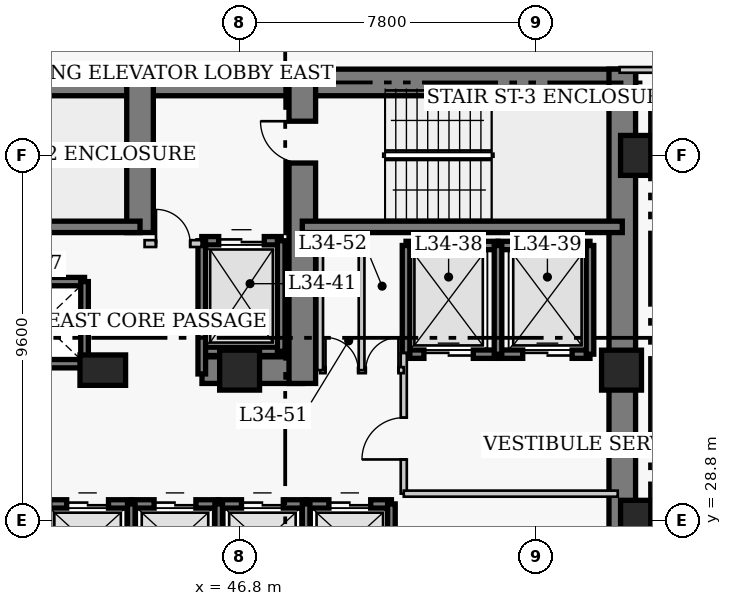
"""IFC4 building model, lengths in metres.
Left out: names, types, materials, properties, quantities, classifications, styles, units other than length and angle.
Written with IfcOpenShell. Run it as: python <this file> out.ifc"""

import sys

from ifc_helpers import new_model, si_unit, direction, frame, frame_2d, origin, origin_2d, place, context, subcontext, project, spatial, rectangle, extrude, element, fill, save


model = new_model("IFC4")
c1 = context("Model", 3, precision=1e-05, world=origin(), true_north=direction((0.0, 1.0)))
c2 = subcontext(c1, "Body", "Model", "MODEL_VIEW")
j1 = project(units=[si_unit("LENGTHUNIT", "METRE"), si_unit("PLANEANGLEUNIT", "RADIAN")], contexts=[c1])
p1 = place(None, origin())
s1 = spatial("IfcSite", under=j1, at=p1, CompositionType="ELEMENT")
p2 = place(p1, origin())
s2 = spatial("IfcBuilding", under=s1, at=p2, CompositionType="ELEMENT")
p3 = place(p2, frame((0.0, 0.0, 138.4)))
s3 = spatial("IfcBuildingStorey", under=s2, at=p3, CompositionType="ELEMENT", Elevation=138.4)
p4 = place(p3, frame((35.85, 40.32, 0.0), z_axis=(0.0, 0.0, 1.0), x_axis=(1.0, 0.0, 0.0)))
e1 = element("IfcWall", 1, at=p4, inside=s3, PredefinedType="SHEAR", context=c2, shape_type="SweptSolid", body=[
    extrude(rectangle(XDim=12.6, YDim=0.7, at=frame_2d((6.3, 0.0))), origin(), (0.0, 0.0, 1.0), 3.8),
])
p5 = place(p3, frame((48.45, 40.32, 0.0), z_axis=(0.0, 0.0, 1.0), x_axis=(1.0, 0.0, 0.0)))
e2 = element("IfcWall", 2, at=p5, inside=s3, PredefinedType="SHEAR", context=c2, shape_type="SweptSolid", body=[
    extrude(rectangle(XDim=8.77, YDim=0.7, at=frame_2d((4.385, 0.0))), origin(), (0.0, 0.0, 1.0), 3.8),
])
p6 = place(p3, frame((56.87, 27.05, 0.0), z_axis=(0.0, 0.0, 1.0), x_axis=(0.0, 1.0, 0.0)))
e3 = element("IfcWall", 3, at=p6, inside=s3, PredefinedType="SHEAR", context=c2, shape_type="SweptSolid", body=[
    extrude(rectangle(XDim=13.62, YDim=0.7, at=frame_2d((6.81, 0.0))), origin(), (0.0, 0.0, 1.0), 3.8),
])
p7 = place(p3, frame((45.81, 32.75, 0.0), z_axis=(0.0, 0.0, 1.0), x_axis=(1.0, 0.0, 0.0)))
e4 = element("IfcWall", 4, at=p7, inside=s3, PredefinedType="SHEAR", context=c2, shape_type="SweptSolid", body=[
    extrude(rectangle(XDim=2.64, YDim=0.7, at=frame_2d((1.32, 0.0))), origin(), (0.0, 0.0, 1.0), 3.8),
])
p8 = place(p3, frame((44.18, 36.37, 0.0), z_axis=(0.0, 0.0, 1.0), x_axis=(0.0, 1.0, 0.0)))
e5 = element("IfcWall", 5, at=p8, inside=s3, PredefinedType="SHEAR", context=c2, shape_type="SweptSolid", body=[
    extrude(rectangle(XDim=3.95, YDim=0.7, at=frame_2d((1.975, 0.0))), origin(), (0.0, 0.0, 1.0), 3.8),
])
p9 = place(p3, frame((48.45, 32.4, 0.0), z_axis=(0.0, 0.0, 1.0), x_axis=(0.0, 1.0, 0.0)))
e6 = element("IfcWall", 6, at=p9, inside=s3, PredefinedType="SHEAR", context=c2, shape_type="SweptSolid", body=[
    extrude(rectangle(XDim=7.92, YDim=0.7, at=frame_2d((3.96, 0.0))), origin(), (0.0, 0.0, 1.0), 3.8),
])
p10 = place(p9, frame((5.8, 0.0, 0.0)))
e7 = element("IfcOpeningElement", 7, at=p10, cuts=e6, PredefinedType="OPENING", context=c2, shape_type="SweptSolid", body=[
    extrude(rectangle(XDim=1.1, YDim=2.15, at=frame_2d((0.55, 1.075))), frame((0.0, 0.36, 0.0), z_axis=(0.0, -1.0, 0.0), x_axis=(1.0, 0.0, 0.0)), (0.0, 0.0, 1.0), 0.72),
])
p11 = place(p3, frame((35.85, 36.52, 0.0), z_axis=(0.0, 0.0, 1.0), x_axis=(1.0, 0.0, 0.0)))
e8 = element("IfcWall", 8, at=p11, inside=s3, PredefinedType="SHEAR", context=c2, shape_type="SweptSolid", body=[
    extrude(rectangle(XDim=8.33, YDim=0.3, at=frame_2d((4.165, 0.0))), origin(), (0.0, 0.0, 1.0), 3.8),
])
p12 = place(p3, frame((48.45, 36.52, 0.0), z_axis=(0.0, 0.0, 1.0), x_axis=(1.0, 0.0, 0.0)))
e9 = element("IfcWall", 9, at=p12, inside=s3, PredefinedType="SHEAR", context=c2, shape_type="SweptSolid", body=[
    extrude(rectangle(XDim=8.42, YDim=0.3, at=frame_2d((4.21, 0.0))), origin(), (0.0, 0.0, 1.0), 3.8),
])
for number, where, z_axis, x_axis in (
    (10, (57.35, 28.8, 0.0), (0.0, 0.0, 1.0), (1.0, 0.0, 0.0)),
    (11, (57.35, 38.4, 0.0), (0.0, 0.0, 1.0), (1.0, 0.0, 0.0)),
):
    element("IfcColumn", number, at=place(p3, frame(where, z_axis=z_axis, x_axis=x_axis)), inside=s3, PredefinedType="COLUMN", context=c2, shape_type="SweptSolid", body=[
        extrude(rectangle(XDim=1.05, YDim=1.05, at=origin_2d()), origin(), (0.0, 0.0, 1.0), 3.8),
    ])
p13 = place(p3, frame((43.2, 32.75, 0.0), z_axis=(0.0, 0.0, 1.0), x_axis=(1.0, 0.0, 0.0)))
e12 = element("IfcColumn", 12, at=p13, inside=s3, PredefinedType="COLUMN", context=c2, shape_type="SweptSolid", body=[
    extrude(rectangle(XDim=1.2, YDim=0.8, at=origin_2d()), origin(), (0.0, 0.0, 1.0), 3.8),
])
for number, where, z_axis, x_axis in (
    (13, (46.8, 32.75, 0.0), (0.0, 0.0, 1.0), (1.0, 0.0, 0.0)),
    (14, (56.85, 32.75, 0.0), (0.0, 0.0, 1.0), (1.0, 0.0, 0.0)),
):
    element("IfcColumn", number, at=place(p3, frame(where, z_axis=z_axis, x_axis=x_axis)), inside=s3, PredefinedType="COLUMN", context=c2, shape_type="SweptSolid", body=[
        extrude(rectangle(XDim=1.05, YDim=1.05, at=origin_2d()), origin(), (0.0, 0.0, 1.0), 3.8),
    ])
p14 = place(p3, frame((41.705, 29.23, 0.0), z_axis=(0.0, 0.0, 1.0), x_axis=(1.0, 0.0, 0.0)))
e15 = element("IfcWall", 15, at=p14, inside=s3, PredefinedType="SHEAR", context=c2, shape_type="SweptSolid", body=[
    extrude(rectangle(XDim=2.245, YDim=0.22, at=frame_2d((1.123, 0.0))), origin(), (0.0, 0.0, 1.0), 3.8),
])
p15 = place(p14, frame((0.545, 0.0, 0.0)))
e16 = element("IfcOpeningElement", 16, at=p15, cuts=e15, PredefinedType="OPENING", context=c2, shape_type="SweptSolid", body=[
    extrude(rectangle(XDim=1.1, YDim=2.15, at=frame_2d((0.55, 1.075))), frame((0.0, 0.12, 0.0), z_axis=(0.0, -1.0, 0.0), x_axis=(1.0, 0.0, 0.0)), (0.0, 0.0, 1.0), 0.24),
])
p16 = place(p3, frame((43.95, 29.23, 0.0), z_axis=(0.0, 0.0, 1.0), x_axis=(1.0, 0.0, 0.0)))
e17 = element("IfcWall", 17, at=p16, inside=s3, PredefinedType="SHEAR", context=c2, shape_type="SweptSolid", body=[
    extrude(rectangle(XDim=2.3, YDim=0.22, at=frame_2d((1.15, 0.0))), origin(), (0.0, 0.0, 1.0), 3.8),
])
p17 = place(p16, frame((0.6, 0.0, 0.0)))
e18 = element("IfcOpeningElement", 18, at=p17, cuts=e17, PredefinedType="OPENING", context=c2, shape_type="SweptSolid", body=[
    extrude(rectangle(XDim=1.1, YDim=2.15, at=frame_2d((0.55, 1.075))), frame((0.0, 0.12, 0.0), z_axis=(0.0, -1.0, 0.0), x_axis=(1.0, 0.0, 0.0)), (0.0, 0.0, 1.0), 0.24),
])
p18 = place(p3, frame((43.95, 27.17, 0.0), z_axis=(0.0, 0.0, 1.0), x_axis=(0.0, 1.0, 0.0)))
e19 = element("IfcWall", 19, at=p18, inside=s3, PredefinedType="SHEAR", context=c2, shape_type="SweptSolid", body=[
    extrude(rectangle(XDim=2.06, YDim=0.2, at=frame_2d((1.03, 0.0))), origin(), (0.0, 0.0, 1.0), 3.8),
])
p19 = place(p3, frame((46.25, 29.23, 0.0), z_axis=(0.0, 0.0, 1.0), x_axis=(1.0, 0.0, 0.0)))
e20 = element("IfcWall", 20, at=p19, inside=s3, PredefinedType="SHEAR", context=c2, shape_type="SweptSolid", body=[
    extrude(rectangle(XDim=2.3, YDim=0.22, at=frame_2d((1.15, 0.0))), origin(), (0.0, 0.0, 1.0), 3.8),
])
p20 = place(p19, frame((0.6, 0.0, 0.0)))
e21 = element("IfcOpeningElement", 21, at=p20, cuts=e20, PredefinedType="OPENING", context=c2, shape_type="SweptSolid", body=[
    extrude(rectangle(XDim=1.1, YDim=2.15, at=frame_2d((0.55, 1.075))), frame((0.0, 0.12, 0.0), z_axis=(0.0, -1.0, 0.0), x_axis=(1.0, 0.0, 0.0)), (0.0, 0.0, 1.0), 0.24),
])
p21 = place(p3, frame((46.25, 27.17, 0.0), z_axis=(0.0, 0.0, 1.0), x_axis=(0.0, 1.0, 0.0)))
e22 = element("IfcWall", 22, at=p21, inside=s3, PredefinedType="SHEAR", context=c2, shape_type="SweptSolid", body=[
    extrude(rectangle(XDim=2.06, YDim=0.2, at=frame_2d((1.03, 0.0))), origin(), (0.0, 0.0, 1.0), 3.8),
])
p22 = place(p3, frame((48.55, 29.23, 0.0), z_axis=(0.0, 0.0, 1.0), x_axis=(1.0, 0.0, 0.0)))
e23 = element("IfcWall", 23, at=p22, inside=s3, PredefinedType="SHEAR", context=c2, shape_type="SweptSolid", body=[
    extrude(rectangle(XDim=2.245, YDim=0.22, at=frame_2d((1.123, 0.0))), origin(), (0.0, 0.0, 1.0), 3.8),
])
p23 = place(p22, frame((0.6, 0.0, 0.0)))
e24 = element("IfcOpeningElement", 24, at=p23, cuts=e23, PredefinedType="OPENING", context=c2, shape_type="SweptSolid", body=[
    extrude(rectangle(XDim=1.1, YDim=2.15, at=frame_2d((0.55, 1.075))), frame((0.0, 0.12, 0.0), z_axis=(0.0, -1.0, 0.0), x_axis=(1.0, 0.0, 0.0)), (0.0, 0.0, 1.0), 0.24),
])
for number, where, z_axis, x_axis in (
    (25, (48.55, 27.17, 0.0), (0.0, 0.0, 1.0), (0.0, 1.0, 0.0)),
    (26, (50.795, 27.17, 0.0), (0.0, 0.0, 1.0), (0.0, 1.0, 0.0)),
):
    element("IfcWall", number, at=place(p3, frame(where, z_axis=z_axis, x_axis=x_axis)), inside=s3, PredefinedType="SHEAR", context=c2, shape_type="SweptSolid", body=[
        extrude(rectangle(XDim=2.06, YDim=0.2, at=frame_2d((1.03, 0.0))), origin(), (0.0, 0.0, 1.0), 3.8),
    ])
for number, where, z_axis, x_axis in (
    (27, (40.4, 35.08, 0.0), (0.0, 0.0, 1.0), (1.0, 0.0, 0.0)),
    (28, (40.4, 32.92, 0.0), (0.0, 0.0, 1.0), (1.0, 0.0, 0.0)),
):
    element("IfcWall", number, at=place(p3, frame(where, z_axis=z_axis, x_axis=x_axis)), inside=s3, PredefinedType="SHEAR", context=c2, shape_type="SweptSolid", body=[
        extrude(rectangle(XDim=2.32, YDim=0.22, at=frame_2d((1.16, 0.0))), origin(), (0.0, 0.0, 1.0), 3.8),
    ])
p24 = place(p3, frame((42.72, 32.92, 0.0), z_axis=(0.0, 0.0, 1.0), x_axis=(0.0, 1.0, 0.0)))
e29 = element("IfcWall", 29, at=p24, inside=s3, PredefinedType="SHEAR", context=c2, shape_type="SweptSolid", body=[
    extrude(rectangle(XDim=2.16, YDim=0.2, at=frame_2d((1.08, 0.0))), origin(), (0.0, 0.0, 1.0), 3.8),
])
p25 = place(p3, frame((51.18, 36.03, 0.0), z_axis=(0.0, 0.0, 1.0), x_axis=(1.0, 0.0, 0.0)))
e30 = element("IfcWall", 30, at=p25, inside=s3, PredefinedType="SHEAR", context=c2, shape_type="SweptSolid", body=[
    extrude(rectangle(XDim=2.42, YDim=0.22, at=frame_2d((1.21, 0.0))), origin(), (0.0, 0.0, 1.0), 3.8),
])
p26 = place(p3, frame((51.18, 33.17, 0.0), z_axis=(0.0, 0.0, 1.0), x_axis=(1.0, 0.0, 0.0)))
e31 = element("IfcWall", 31, at=p26, inside=s3, PredefinedType="SHEAR", context=c2, shape_type="SweptSolid", body=[
    extrude(rectangle(XDim=2.42, YDim=0.22, at=frame_2d((1.21, 0.0))), origin(), (0.0, 0.0, 1.0), 3.8),
])
p27 = place(p26, frame((0.47, 0.0, 0.0)))
e32 = element("IfcOpeningElement", 32, at=p27, cuts=e31, PredefinedType="OPENING", context=c2, shape_type="SweptSolid", body=[
    extrude(rectangle(XDim=1.3, YDim=2.15, at=frame_2d((0.65, 1.075))), frame((0.0, 0.12, 0.0), z_axis=(0.0, -1.0, 0.0), x_axis=(1.0, 0.0, 0.0)), (0.0, 0.0, 1.0), 0.24),
])
p28 = place(p3, frame((51.18, 33.17, 0.0), z_axis=(0.0, 0.0, 1.0), x_axis=(0.0, 1.0, 0.0)))
e33 = element("IfcWall", 33, at=p28, inside=s3, PredefinedType="SHEAR", context=c2, shape_type="SweptSolid", body=[
    extrude(rectangle(XDim=2.86, YDim=0.2, at=frame_2d((1.43, 0.0))), origin(), (0.0, 0.0, 1.0), 3.8),
])
p29 = place(p3, frame((53.6, 36.03, 0.0), z_axis=(0.0, 0.0, 1.0), x_axis=(1.0, 0.0, 0.0)))
e34 = element("IfcWall", 34, at=p29, inside=s3, PredefinedType="SHEAR", context=c2, shape_type="SweptSolid", body=[
    extrude(rectangle(XDim=2.42, YDim=0.22, at=frame_2d((1.21, 0.0))), origin(), (0.0, 0.0, 1.0), 3.8),
])
p30 = place(p3, frame((53.6, 33.17, 0.0), z_axis=(0.0, 0.0, 1.0), x_axis=(1.0, 0.0, 0.0)))
e35 = element("IfcWall", 35, at=p30, inside=s3, PredefinedType="SHEAR", context=c2, shape_type="SweptSolid", body=[
    extrude(rectangle(XDim=2.42, YDim=0.22, at=frame_2d((1.21, 0.0))), origin(), (0.0, 0.0, 1.0), 3.8),
])
p31 = place(p30, frame((0.65, 0.0, 0.0)))
e36 = element("IfcOpeningElement", 36, at=p31, cuts=e35, PredefinedType="OPENING", context=c2, shape_type="SweptSolid", body=[
    extrude(rectangle(XDim=1.3, YDim=2.15, at=frame_2d((0.65, 1.075))), frame((0.0, 0.12, 0.0), z_axis=(0.0, -1.0, 0.0), x_axis=(1.0, 0.0, 0.0)), (0.0, 0.0, 1.0), 0.24),
])
for number, where, z_axis, x_axis in (
    (37, (53.6, 33.17, 0.0), (0.0, 0.0, 1.0), (0.0, 1.0, 0.0)),
    (38, (56.02, 33.17, 0.0), (0.0, 0.0, 1.0), (0.0, 1.0, 0.0)),
):
    element("IfcWall", number, at=place(p3, frame(where, z_axis=z_axis, x_axis=x_axis)), inside=s3, PredefinedType="SHEAR", context=c2, shape_type="SweptSolid", body=[
        extrude(rectangle(XDim=2.86, YDim=0.2, at=frame_2d((1.43, 0.0))), origin(), (0.0, 0.0, 1.0), 3.8),
    ])
p32 = place(p3, frame((45.805, 36.155, 0.0), z_axis=(0.0, 0.0, 1.0), x_axis=(1.0, 0.0, 0.0)))
e39 = element("IfcWall", 39, at=p32, inside=s3, PredefinedType="SHEAR", context=c2, shape_type="SweptSolid", body=[
    extrude(rectangle(XDim=2.09, YDim=0.22, at=frame_2d((1.045, 0.0))), origin(), (0.0, 0.0, 1.0), 3.8),
])
p33 = place(p32, frame((0.445, 0.0, 0.0)))
e40 = element("IfcOpeningElement", 40, at=p33, cuts=e39, PredefinedType="OPENING", context=c2, shape_type="SweptSolid", body=[
    extrude(rectangle(XDim=1.2, YDim=2.15, at=frame_2d((0.6, 1.075))), frame((0.0, 0.12, 0.0), z_axis=(0.0, -1.0, 0.0), x_axis=(1.0, 0.0, 0.0)), (0.0, 0.0, 1.0), 0.24),
])
p34 = place(p3, frame((45.805, 33.245, 0.0), z_axis=(0.0, 0.0, 1.0), x_axis=(1.0, 0.0, 0.0)))
e41 = element("IfcWall", 41, at=p34, inside=s3, PredefinedType="SHEAR", context=c2, shape_type="SweptSolid", body=[
    extrude(rectangle(XDim=2.09, YDim=0.22, at=frame_2d((1.045, 0.0))), origin(), (0.0, 0.0, 1.0), 3.8),
])
p35 = place(p3, frame((45.805, 32.65, 0.0), z_axis=(0.0, 0.0, 1.0), x_axis=(0.0, 1.0, 0.0)))
e42 = element("IfcWall", 42, at=p35, inside=s3, PredefinedType="SHEAR", context=c2, shape_type="SweptSolid", body=[
    extrude(rectangle(XDim=3.505, YDim=0.2, at=frame_2d((1.752, 0.0))), origin(), (0.0, 0.0, 1.0), 3.8),
])
p36 = place(p3, frame((47.895, 33.245, 0.0), z_axis=(0.0, 0.0, 1.0), x_axis=(0.0, 1.0, 0.0)))
e43 = element("IfcWall", 43, at=p36, inside=s3, PredefinedType="SHEAR", context=c2, shape_type="SweptSolid", body=[
    extrude(rectangle(XDim=2.91, YDim=0.2, at=frame_2d((1.455, 0.0))), origin(), (0.0, 0.0, 1.0), 3.8),
])
p37 = place(p3, frame((44.3, 36.08, 0.0), z_axis=(0.0, 0.0, 1.0), x_axis=(1.0, 0.0, 0.0)))
e44 = element("IfcWall", 44, at=p37, inside=s3, PredefinedType="PARTITIONING", context=c2, shape_type="SweptSolid", body=[
    extrude(rectangle(XDim=1.5, YDim=0.18, at=frame_2d((0.75, 0.0))), origin(), (0.0, 0.0, 1.0), 3.55),
])
p38 = place(p37, frame((0.3, 0.0, 0.0)))
e45 = element("IfcOpeningElement", 45, at=p38, cuts=e44, PredefinedType="OPENING", context=c2, shape_type="SweptSolid", body=[
    extrude(rectangle(XDim=0.9, YDim=2.15, at=frame_2d((0.45, 1.075))), frame((0.0, 0.1, 0.0), z_axis=(0.0, -1.0, 0.0), x_axis=(1.0, 0.0, 0.0)), (0.0, 0.0, 1.0), 0.2),
])
p39 = place(p3, frame((51.12, 29.5, 0.0), z_axis=(0.0, 0.0, 1.0), x_axis=(0.0, 1.0, 0.0)))
e46 = element("IfcWall", 46, at=p39, inside=s3, PredefinedType="PARTITIONING", context=c2, shape_type="SweptSolid", body=[
    extrude(rectangle(XDim=3.7, YDim=0.16, at=frame_2d((1.85, 0.0))), origin(), (0.0, 0.0, 1.0), 3.55),
])
p40 = place(p39, frame((0.9, 0.0, 0.0)))
e47 = element("IfcOpeningElement", 47, at=p40, cuts=e46, PredefinedType="OPENING", context=c2, shape_type="SweptSolid", body=[
    extrude(rectangle(XDim=1.1, YDim=2.15, at=frame_2d((0.55, 1.075))), frame((0.0, 0.09, 0.0), z_axis=(0.0, -1.0, 0.0), x_axis=(1.0, 0.0, 0.0)), (0.0, 0.0, 1.0), 0.18),
])
p41 = place(p3, frame((51.12, 29.5, 0.0), z_axis=(0.0, 0.0, 1.0), x_axis=(1.0, 0.0, 0.0)))
e48 = element("IfcWall", 48, at=p41, inside=s3, PredefinedType="PARTITIONING", context=c2, shape_type="SweptSolid", body=[
    extrude(rectangle(XDim=5.63, YDim=0.16, at=frame_2d((2.815, 0.0))), origin(), (0.0, 0.0, 1.0), 3.55),
])
p42 = place(p3, frame((48.92, 32.75, 0.0), z_axis=(0.0, 0.0, 1.0), x_axis=(1.0, 0.0, 0.0)))
e49 = element("IfcWall", 49, at=p42, inside=s3, PredefinedType="PARTITIONING", context=c2, shape_type="SweptSolid", body=[
    extrude(rectangle(XDim=2.2, YDim=0.16, at=frame_2d((1.1, 0.0))), origin(), (0.0, 0.0, 1.0), 3.55),
])
p43 = place(p42, frame((0.14, 0.0, 0.0)))
e50 = element("IfcOpeningElement", 50, at=p43, cuts=e49, PredefinedType="OPENING", context=c2, shape_type="SweptSolid", body=[
    extrude(rectangle(XDim=0.86, YDim=2.05, at=frame_2d((0.43, 1.025))), frame((0.0, 0.09, 0.0), z_axis=(0.0, -1.0, 0.0), x_axis=(1.0, 0.0, 0.0)), (0.0, 0.0, 1.0), 0.18),
])
p44 = place(p42, frame((1.2, 0.0, 0.0)))
e51 = element("IfcOpeningElement", 51, at=p44, cuts=e49, PredefinedType="OPENING", context=c2, shape_type="SweptSolid", body=[
    extrude(rectangle(XDim=0.86, YDim=2.05, at=frame_2d((0.43, 1.025))), frame((0.0, 0.09, 0.0), z_axis=(0.0, -1.0, 0.0), x_axis=(1.0, 0.0, 0.0)), (0.0, 0.0, 1.0), 0.18),
])
for number, where, z_axis, x_axis in (
    (52, (48.92, 32.75, 0.0), (0.0, 0.0, 1.0), (0.0, 1.0, 0.0)),
    (53, (50.01, 32.75, 0.0), (0.0, 0.0, 1.0), (0.0, 1.0, 0.0)),
):
    element("IfcWall", number, at=place(p3, frame(where, z_axis=z_axis, x_axis=x_axis)), inside=s3, PredefinedType="PARTITIONING", context=c2, shape_type="SweptSolid", body=[
        extrude(rectangle(XDim=3.62, YDim=0.15, at=frame_2d((1.81, 0.0))), origin(), (0.0, 0.0, 1.0), 3.55),
    ])
p45 = place(p3, frame((56.8, 40.65, 0.0), z_axis=(0.0, 0.0, 1.0), x_axis=(1.0, 0.0, 0.0)))
e54 = element("IfcWall", 54, at=p45, inside=s3, PredefinedType="PARTITIONING", context=c2, shape_type="SweptSolid", body=[
    extrude(rectangle(XDim=4.36, YDim=0.15, at=frame_2d((2.18, 0.0))), origin(), (0.0, 0.0, 1.0), 3.55),
])
p46 = place(p45, frame((2.75, 0.0, 0.0)))
e55 = element("IfcOpeningElement", 55, at=p46, cuts=e54, PredefinedType="OPENING", context=c2, shape_type="SweptSolid", body=[
    extrude(rectangle(XDim=1.0, YDim=2.15, at=frame_2d((0.5, 1.075))), frame((0.0, 0.085, 0.0), z_axis=(0.0, -1.0, 0.0), x_axis=(1.0, 0.0, 0.0)), (0.0, 0.0, 1.0), 0.17),
])
p47 = place(p15, origin())
e56 = element("IfcDoor", 56, at=p47, inside=s3, OperationType="DOUBLE_DOOR_SLIDING", PredefinedType="DOOR", context=c2, shape_type="SweptSolid", body=[
    extrude(rectangle(XDim=1.1, YDim=2.15, at=frame_2d((0.55, 1.075))), frame((0.0, 0.025, 0.0), z_axis=(0.0, -1.0, 0.0), x_axis=(1.0, 0.0, 0.0)), (0.0, 0.0, 1.0), 0.05),
])
fill(e16, e56)
p48 = place(p17, origin())
e57 = element("IfcDoor", 57, at=p48, inside=s3, OperationType="DOUBLE_DOOR_SLIDING", PredefinedType="DOOR", context=c2, shape_type="SweptSolid", body=[
    extrude(rectangle(XDim=1.1, YDim=2.15, at=frame_2d((0.55, 1.075))), frame((0.0, 0.025, 0.0), z_axis=(0.0, -1.0, 0.0), x_axis=(1.0, 0.0, 0.0)), (0.0, 0.0, 1.0), 0.05),
])
fill(e18, e57)
p49 = place(p20, origin())
e58 = element("IfcDoor", 58, at=p49, inside=s3, OperationType="DOUBLE_DOOR_SLIDING", PredefinedType="DOOR", context=c2, shape_type="SweptSolid", body=[
    extrude(rectangle(XDim=1.1, YDim=2.15, at=frame_2d((0.55, 1.075))), frame((0.0, 0.025, 0.0), z_axis=(0.0, -1.0, 0.0), x_axis=(1.0, 0.0, 0.0)), (0.0, 0.0, 1.0), 0.05),
])
fill(e21, e58)
p50 = place(p23, origin())
e59 = element("IfcDoor", 59, at=p50, inside=s3, OperationType="DOUBLE_DOOR_SLIDING", PredefinedType="DOOR", context=c2, shape_type="SweptSolid", body=[
    extrude(rectangle(XDim=1.1, YDim=2.15, at=frame_2d((0.55, 1.075))), frame((0.0, 0.025, 0.0), z_axis=(0.0, -1.0, 0.0), x_axis=(1.0, 0.0, 0.0)), (0.0, 0.0, 1.0), 0.05),
])
fill(e24, e59)
p51 = place(p27, origin())
e60 = element("IfcDoor", 60, at=p51, inside=s3, OperationType="DOUBLE_DOOR_SLIDING", PredefinedType="DOOR", context=c2, shape_type="SweptSolid", body=[
    extrude(rectangle(XDim=1.3, YDim=2.15, at=frame_2d((0.65, 1.075))), frame((0.0, 0.025, 0.0), z_axis=(0.0, -1.0, 0.0), x_axis=(1.0, 0.0, 0.0)), (0.0, 0.0, 1.0), 0.05),
])
fill(e32, e60)
p52 = place(p31, origin())
e61 = element("IfcDoor", 61, at=p52, inside=s3, OperationType="DOUBLE_DOOR_SLIDING", PredefinedType="DOOR", context=c2, shape_type="SweptSolid", body=[
    extrude(rectangle(XDim=1.3, YDim=2.15, at=frame_2d((0.65, 1.075))), frame((0.0, 0.025, 0.0), z_axis=(0.0, -1.0, 0.0), x_axis=(1.0, 0.0, 0.0)), (0.0, 0.0, 1.0), 0.05),
])
fill(e36, e61)
p53 = place(p33, origin())
e62 = element("IfcDoor", 62, at=p53, inside=s3, OperationType="DOUBLE_DOOR_SLIDING", PredefinedType="DOOR", context=c2, shape_type="SweptSolid", body=[
    extrude(rectangle(XDim=1.2, YDim=2.15, at=frame_2d((0.6, 1.075))), frame((0.0, 0.025, 0.0), z_axis=(0.0, -1.0, 0.0), x_axis=(1.0, 0.0, 0.0)), (0.0, 0.0, 1.0), 0.05),
])
fill(e40, e62)
p54 = place(p38, origin())
e63 = element("IfcDoor", 63, at=p54, inside=s3, OperationType="SINGLE_SWING_LEFT", PredefinedType="DOOR", context=c2, shape_type="SweptSolid", body=[
    extrude(rectangle(XDim=0.9, YDim=2.15, at=frame_2d((0.45, 1.075))), frame((0.0, 0.025, 0.0), z_axis=(0.0, -1.0, 0.0), x_axis=(1.0, 0.0, 0.0)), (0.0, 0.0, 1.0), 0.05),
])
fill(e45, e63)
p55 = place(p40, origin())
e64 = element("IfcDoor", 64, at=p55, inside=s3, OperationType="SINGLE_SWING_LEFT", PredefinedType="DOOR", context=c2, shape_type="SweptSolid", body=[
    extrude(rectangle(XDim=1.1, YDim=2.15, at=frame_2d((0.55, 1.075))), frame((0.0, 0.025, 0.0), z_axis=(0.0, -1.0, 0.0), x_axis=(1.0, 0.0, 0.0)), (0.0, 0.0, 1.0), 0.05),
])
fill(e47, e64)
p56 = place(p43, origin())
e65 = element("IfcDoor", 65, at=p56, inside=s3, OperationType="SINGLE_SWING_LEFT", PredefinedType="DOOR", context=c2, shape_type="SweptSolid", body=[
    extrude(rectangle(XDim=0.86, YDim=2.05, at=frame_2d((0.43, 1.025))), frame((0.0, 0.025, 0.0), z_axis=(0.0, -1.0, 0.0), x_axis=(1.0, 0.0, 0.0)), (0.0, 0.0, 1.0), 0.05),
])
fill(e50, e65)
p57 = place(p44, origin())
e66 = element("IfcDoor", 66, at=p57, inside=s3, OperationType="SINGLE_SWING_RIGHT", PredefinedType="DOOR", context=c2, shape_type="SweptSolid", body=[
    extrude(rectangle(XDim=0.86, YDim=2.05, at=frame_2d((0.43, 1.025))), frame((0.0, 0.025, 0.0), z_axis=(0.0, -1.0, 0.0), x_axis=(1.0, 0.0, 0.0)), (0.0, 0.0, 1.0), 0.05),
])
fill(e51, e66)
p58 = place(p10, origin())
e67 = element("IfcDoor", 67, at=p58, inside=s3, OperationType="SINGLE_SWING_RIGHT", PredefinedType="DOOR", context=c2, shape_type="SweptSolid", body=[
    extrude(rectangle(XDim=1.1, YDim=2.15, at=frame_2d((0.55, 1.075))), frame((0.0, 0.025, 0.0), z_axis=(0.0, -1.0, 0.0), x_axis=(1.0, 0.0, 0.0)), (0.0, 0.0, 1.0), 0.05),
])
fill(e7, e67)
save(model, sys.argv[1])
